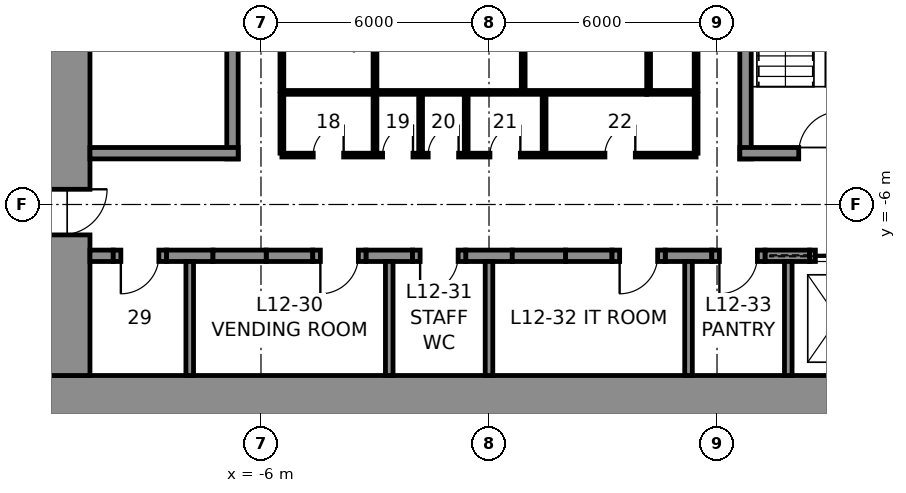
"""IFC4 building model, lengths in metres.
Left out: names, types, materials, properties, quantities, classifications, styles, units other than length and angle.
Written with IfcOpenShell. Run it as: python <this file> out.ifc"""

import sys

from ifc_helpers import new_model, si_unit, direction, frame, frame_2d, origin, place, context, subcontext, project, spatial, rectangle, extrude, element, fill, save


model = new_model("IFC4")
c1 = context("Model", 3, precision=1e-05, world=origin(), true_north=direction((0.0, 1.0)))
c2 = subcontext(c1, "Body", "Model", "MODEL_VIEW")
j1 = project(units=[si_unit("LENGTHUNIT", "METRE"), si_unit("PLANEANGLEUNIT", "RADIAN")], contexts=[c1])
p1 = place(None, origin())
s1 = spatial("IfcSite", under=j1, at=p1, CompositionType="ELEMENT")
p2 = place(p1, origin())
s2 = spatial("IfcBuilding", under=s1, at=p2, CompositionType="ELEMENT")
p3 = place(p2, frame((0.0, 0.0, 65.0)))
s3 = spatial("IfcBuildingStorey", under=s2, at=p3, CompositionType="ELEMENT", Elevation=65.0)
p4 = place(p3, frame((12.0, -11.25, 0.0), z_axis=(0.0, 0.0, 1.0), x_axis=(-1.0, 0.0, 0.0)))
e1 = element("IfcWall", 1, at=p4, inside=s3, PredefinedType="SHEAR", context=c2, shape_type="SweptSolid", body=[
    extrude(rectangle(XDim=24.0, YDim=1.5, at=frame_2d((12.0, 0.0))), origin(), (0.0, 0.0, 1.0), 5.5),
])
p5 = place(p3, frame((-11.25, -10.5, 0.0), z_axis=(0.0, 0.0, 1.0), x_axis=(0.0, 1.0, 0.0)))
e2 = element("IfcWall", 2, at=p5, inside=s3, PredefinedType="SHEAR", context=c2, shape_type="SweptSolid", body=[
    extrude(rectangle(XDim=21.0, YDim=1.5, at=frame_2d((10.5, 0.0))), origin(), (0.0, 0.0, 1.0), 5.5),
])
p6 = place(p5, frame((16.1, 0.0, 0.0)))
e3 = element("IfcOpeningElement", 3, at=p6, cuts=e2, PredefinedType="OPENING", context=c2, shape_type="SweptSolid", body=[
    extrude(rectangle(XDim=1.2, YDim=2.3, at=frame_2d((0.6, 1.15))), frame((0.0, 0.76, 0.0), z_axis=(0.0, -1.0, 0.0), x_axis=(1.0, 0.0, 0.0)), (0.0, 0.0, 1.0), 1.52),
])
p7 = place(p5, frame((3.7, 0.0, 0.0)))
e4 = element("IfcOpeningElement", 4, at=p7, cuts=e2, PredefinedType="OPENING", context=c2, shape_type="SweptSolid", body=[
    extrude(rectangle(XDim=1.2, YDim=2.3, at=frame_2d((0.6, 1.15))), frame((0.0, 0.76, 0.0), z_axis=(0.0, -1.0, 0.0), x_axis=(1.0, 0.0, 0.0)), (0.0, 0.0, 1.0), 1.52),
])
p8 = place(p3, frame((-10.5, -7.35, 0.0), z_axis=(0.0, 0.0, 1.0), x_axis=(1.0, 0.0, 0.0)))
e5 = element("IfcWall", 5, at=p8, inside=s3, PredefinedType="SHEAR", context=c2, shape_type="SweptSolid", body=[
    extrude(rectangle(XDim=0.613, YDim=0.3, at=frame_2d((0.306, 0.0))), origin(), (0.0, 0.0, 1.0), 5.5),
])
for number, where, z_axis, x_axis in (
    (6, (-8.488, -7.35, 0.0), (0.0, 0.0, 1.0), (1.0, 0.0, 0.0)),
    (7, (-5.863, -7.35, 0.0), (0.0, 0.0, 1.0), (1.0, 0.0, 0.0)),
    (8, (-3.238, -7.35, 0.0), (0.0, 0.0, 1.0), (1.0, 0.0, 0.0)),
    (9, (-0.613, -7.35, 0.0), (0.0, 0.0, 1.0), (1.0, 0.0, 0.0)),
    (10, (2.012, -7.35, 0.0), (0.0, 0.0, 1.0), (1.0, 0.0, 0.0)),
    (11, (4.637, -7.35, 0.0), (0.0, 0.0, 1.0), (1.0, 0.0, 0.0)),
):
    element("IfcWall", number, at=place(p3, frame(where, z_axis=z_axis, x_axis=x_axis)), inside=s3, PredefinedType="SHEAR", context=c2, shape_type="SweptSolid", body=[
        extrude(rectangle(XDim=1.225, YDim=0.3, at=frame_2d((0.613, 0.0))), origin(), (0.0, 0.0, 1.0), 5.5),
    ])
p9 = place(p3, frame((7.262, -7.35, 0.0), z_axis=(0.0, 0.0, 1.0), x_axis=(1.0, 0.0, 0.0)))
e12 = element("IfcWall", 12, at=p9, inside=s3, PredefinedType="SHEAR", context=c2, shape_type="SweptSolid", body=[
    extrude(rectangle(XDim=1.175, YDim=0.3, at=frame_2d((0.587, 0.0))), origin(), (0.0, 0.0, 1.0), 5.5),
])
p10 = place(p3, frame((-9.887, -7.35, 0.0), z_axis=(0.0, 0.0, 1.0), x_axis=(1.0, 0.0, 0.0)))
e13 = element("IfcWall", 13, at=p10, inside=s3, PredefinedType="PARTITIONING", context=c2, shape_type="SweptSolid", body=[
    extrude(rectangle(XDim=1.4, YDim=0.3, at=frame_2d((0.7, 0.0))), origin(), (0.0, 0.0, 1.0), 5.5),
])
p11 = place(p10, frame((0.2, 0.0, 0.0)))
e14 = element("IfcOpeningElement", 14, at=p11, cuts=e13, PredefinedType="OPENING", context=c2, shape_type="SweptSolid", body=[
    extrude(rectangle(XDim=1.0, YDim=2.3, at=frame_2d((0.5, 1.15))), frame((0.0, 0.16, 0.0), z_axis=(0.0, -1.0, 0.0), x_axis=(1.0, 0.0, 0.0)), (0.0, 0.0, 1.0), 0.32),
])
p12 = place(p3, frame((-7.262, -7.35, 0.0), z_axis=(0.0, 0.0, 1.0), x_axis=(1.0, 0.0, 0.0)))
e15 = element("IfcWall", 15, at=p12, inside=s3, PredefinedType="PARTITIONING", context=c2, shape_type="SweptSolid", body=[
    extrude(rectangle(XDim=1.4, YDim=0.3, at=frame_2d((0.7, 0.0))), origin(), (0.0, 0.0, 1.0), 5.5),
])
p13 = place(p3, frame((-4.637, -7.35, 0.0), z_axis=(0.0, 0.0, 1.0), x_axis=(1.0, 0.0, 0.0)))
e16 = element("IfcWall", 16, at=p13, inside=s3, PredefinedType="PARTITIONING", context=c2, shape_type="SweptSolid", body=[
    extrude(rectangle(XDim=1.4, YDim=0.3, at=frame_2d((0.7, 0.0))), origin(), (0.0, 0.0, 1.0), 5.5),
])
p14 = place(p13, frame((0.2, 0.0, 0.0)))
e17 = element("IfcOpeningElement", 17, at=p14, cuts=e16, PredefinedType="OPENING", context=c2, shape_type="SweptSolid", body=[
    extrude(rectangle(XDim=1.0, YDim=2.3, at=frame_2d((0.5, 1.15))), frame((0.0, 0.16, 0.0), z_axis=(0.0, -1.0, 0.0), x_axis=(1.0, 0.0, 0.0)), (0.0, 0.0, 1.0), 0.32),
])
p15 = place(p3, frame((-2.012, -7.35, 0.0), z_axis=(0.0, 0.0, 1.0), x_axis=(1.0, 0.0, 0.0)))
e18 = element("IfcWall", 18, at=p15, inside=s3, PredefinedType="PARTITIONING", context=c2, shape_type="SweptSolid", body=[
    extrude(rectangle(XDim=1.4, YDim=0.3, at=frame_2d((0.7, 0.0))), origin(), (0.0, 0.0, 1.0), 5.5),
])
p16 = place(p15, frame((0.2, 0.0, 0.0)))
e19 = element("IfcOpeningElement", 19, at=p16, cuts=e18, PredefinedType="OPENING", context=c2, shape_type="SweptSolid", body=[
    extrude(rectangle(XDim=1.0, YDim=2.3, at=frame_2d((0.5, 1.15))), frame((0.0, 0.16, 0.0), z_axis=(0.0, -1.0, 0.0), x_axis=(1.0, 0.0, 0.0)), (0.0, 0.0, 1.0), 0.32),
])
p17 = place(p3, frame((0.613, -7.35, 0.0), z_axis=(0.0, 0.0, 1.0), x_axis=(1.0, 0.0, 0.0)))
e20 = element("IfcWall", 20, at=p17, inside=s3, PredefinedType="PARTITIONING", context=c2, shape_type="SweptSolid", body=[
    extrude(rectangle(XDim=1.4, YDim=0.3, at=frame_2d((0.7, 0.0))), origin(), (0.0, 0.0, 1.0), 5.5),
])
p18 = place(p3, frame((3.238, -7.35, 0.0), z_axis=(0.0, 0.0, 1.0), x_axis=(1.0, 0.0, 0.0)))
e21 = element("IfcWall", 21, at=p18, inside=s3, PredefinedType="PARTITIONING", context=c2, shape_type="SweptSolid", body=[
    extrude(rectangle(XDim=1.4, YDim=0.3, at=frame_2d((0.7, 0.0))), origin(), (0.0, 0.0, 1.0), 5.5),
])
p19 = place(p18, frame((0.2, 0.0, 0.0)))
e22 = element("IfcOpeningElement", 22, at=p19, cuts=e21, PredefinedType="OPENING", context=c2, shape_type="SweptSolid", body=[
    extrude(rectangle(XDim=1.0, YDim=2.3, at=frame_2d((0.5, 1.15))), frame((0.0, 0.16, 0.0), z_axis=(0.0, -1.0, 0.0), x_axis=(1.0, 0.0, 0.0)), (0.0, 0.0, 1.0), 0.32),
])
p20 = place(p3, frame((5.863, -7.35, 0.0), z_axis=(0.0, 0.0, 1.0), x_axis=(1.0, 0.0, 0.0)))
e23 = element("IfcWall", 23, at=p20, inside=s3, PredefinedType="PARTITIONING", context=c2, shape_type="SweptSolid", body=[
    extrude(rectangle(XDim=1.4, YDim=0.3, at=frame_2d((0.7, 0.0))), origin(), (0.0, 0.0, 1.0), 5.5),
])
p21 = place(p20, frame((0.2, 0.0, 0.0)))
e24 = element("IfcOpeningElement", 24, at=p21, cuts=e23, PredefinedType="OPENING", context=c2, shape_type="SweptSolid", body=[
    extrude(rectangle(XDim=1.0, YDim=2.3, at=frame_2d((0.5, 1.15))), frame((0.0, 0.16, 0.0), z_axis=(0.0, -1.0, 0.0), x_axis=(1.0, 0.0, 0.0)), (0.0, 0.0, 1.0), 0.32),
])
p22 = place(p3, frame((8.438, -7.35, 0.0), z_axis=(0.0, 0.0, 1.0), x_axis=(1.0, 0.0, 0.0)))
e25 = element("IfcWall", 25, at=p22, inside=s3, PredefinedType="PARTITIONING", context=c2, shape_type="SweptSolid", body=[
    extrude(rectangle(XDim=1.5, YDim=0.3, at=frame_2d((0.75, 0.0))), origin(), (0.0, 0.0, 1.0), 5.5),
])
p23 = place(p22, frame((0.15, 0.0, 0.0)))
e26 = element("IfcOpeningElement", 26, at=p23, cuts=e25, PredefinedType="OPENING", context=c2, shape_type="SweptSolid", body=[
    extrude(rectangle(XDim=1.2, YDim=2.3, at=frame_2d((0.6, 1.15))), frame((0.0, 0.16, 0.0), z_axis=(0.0, -1.0, 0.0), x_axis=(1.0, 0.0, 0.0)), (0.0, 0.0, 1.0), 0.32),
])
for number, where, z_axis, x_axis in (
    (27, (-7.875, -10.5, 0.0), (0.0, 0.0, 1.0), (0.0, 1.0, 0.0)),
    (28, (-2.625, -10.5, 0.0), (0.0, 0.0, 1.0), (0.0, 1.0, 0.0)),
    (29, (0.0, -10.5, 0.0), (0.0, 0.0, 1.0), (0.0, 1.0, 0.0)),
    (30, (5.25, -10.5, 0.0), (0.0, 0.0, 1.0), (0.0, 1.0, 0.0)),
    (31, (7.875, -10.5, 0.0), (0.0, 0.0, 1.0), (0.0, 1.0, 0.0)),
):
    element("IfcWall", number, at=place(p3, frame(where, z_axis=z_axis, x_axis=x_axis)), inside=s3, PredefinedType="PARTITIONING", context=c2, shape_type="SweptSolid", body=[
        extrude(rectangle(XDim=3.0, YDim=0.2, at=frame_2d((1.5, 0.0))), origin(), (0.0, 0.0, 1.0), 5.5),
    ])
p24 = place(p3, frame((-6.75, -4.8, 0.0), z_axis=(0.0, 0.0, 1.0), x_axis=(0.0, 1.0, 0.0)))
e32 = element("IfcWall", 32, at=p24, inside=s3, PredefinedType="SOLIDWALL", context=c2, shape_type="SweptSolid", body=[
    extrude(rectangle(XDim=9.6, YDim=0.3, at=frame_2d((4.8, 0.0))), origin(), (0.0, 0.0, 1.0), 5.25),
])
p25 = place(p3, frame((-6.6, -4.65, 0.0), z_axis=(0.0, 0.0, 1.0), x_axis=(-1.0, 0.0, 0.0)))
e33 = element("IfcWall", 33, at=p25, inside=s3, PredefinedType="SOLIDWALL", context=c2, shape_type="SweptSolid", body=[
    extrude(rectangle(XDim=3.9, YDim=0.3, at=frame_2d((1.95, 0.0))), origin(), (0.0, 0.0, 1.0), 5.25),
])
p26 = place(p3, frame((6.75, -4.8, 0.0), z_axis=(0.0, 0.0, 1.0), x_axis=(0.0, 1.0, 0.0)))
e34 = element("IfcWall", 34, at=p26, inside=s3, PredefinedType="SOLIDWALL", context=c2, shape_type="SweptSolid", body=[
    extrude(rectangle(XDim=9.6, YDim=0.3, at=frame_2d((4.8, 0.0))), origin(), (0.0, 0.0, 1.0), 5.25),
])
p27 = place(p3, frame((10.5, -4.65, 0.0), z_axis=(0.0, 0.0, 1.0), x_axis=(-1.0, 0.0, 0.0)))
e35 = element("IfcWall", 35, at=p27, inside=s3, PredefinedType="SOLIDWALL", context=c2, shape_type="SweptSolid", body=[
    extrude(rectangle(XDim=3.9, YDim=0.3, at=frame_2d((1.95, 0.0))), origin(), (0.0, 0.0, 1.0), 5.25),
])
p28 = place(p27, frame((1.25, 0.0, 0.0)))
e36 = element("IfcOpeningElement", 36, at=p28, cuts=e35, PredefinedType="OPENING", context=c2, shape_type="SweptSolid", body=[
    extrude(rectangle(XDim=1.1, YDim=2.3, at=frame_2d((0.55, 1.15))), frame((0.0, 0.16, 0.0), z_axis=(0.0, -1.0, 0.0), x_axis=(1.0, 0.0, 0.0)), (0.0, 0.0, 1.0), 0.32),
])
p29 = place(p3, frame((4.15, -3.05, 0.0), z_axis=(0.0, 0.0, 1.0), x_axis=(-1.0, 0.0, 0.0)))
e37 = element("IfcWall", 37, at=p29, inside=s3, PredefinedType="PARTITIONING", context=c2, shape_type="SweptSolid", body=[
    extrude(rectangle(XDim=9.6, YDim=0.1, at=frame_2d((4.8, 0.0))), origin(), (0.0, 0.0, 1.0), 5.25),
])
p30 = place(p3, frame((5.45, -3.05, 0.0), z_axis=(0.0, 0.0, 1.0), x_axis=(-1.0, 0.0, 0.0)))
e38 = element("IfcWall", 38, at=p30, inside=s3, PredefinedType="PARTITIONING", context=c2, shape_type="SweptSolid", body=[
    extrude(rectangle(XDim=1.3, YDim=0.1, at=frame_2d((0.65, 0.0))), origin(), (0.0, 0.0, 1.0), 5.25),
])
for number, where, z_axis, x_axis in (
    (39, (5.45, 3.0, 0.0), (0.0, 0.0, 1.0), (0.0, -1.0, 0.0)),
    (40, (-5.45, -3.0, 0.0), (0.0, 0.0, 1.0), (0.0, 1.0, 0.0)),
    (41, (-3.0, -3.0, 0.0), (0.0, 0.0, 1.0), (0.0, 1.0, 0.0)),
    (42, (0.9, -3.0, 0.0), (0.0, 0.0, 1.0), (0.0, 1.0, 0.0)),
    (43, (4.2, -3.0, 0.0), (0.0, 0.0, 1.0), (0.0, 1.0, 0.0)),
):
    element("IfcWall", number, at=place(p3, frame(where, z_axis=z_axis, x_axis=x_axis)), inside=s3, PredefinedType="PARTITIONING", context=c2, shape_type="SweptSolid", body=[
        extrude(rectangle(XDim=6.0, YDim=0.1, at=frame_2d((3.0, 0.0))), origin(), (0.0, 0.0, 1.0), 5.25),
    ])
p31 = place(p3, frame((5.45, -4.7, 0.0), z_axis=(0.0, 0.0, 1.0), x_axis=(-1.0, 0.0, 0.0)))
e44 = element("IfcWall", 44, at=p31, inside=s3, PredefinedType="PARTITIONING", context=c2, shape_type="SweptSolid", body=[
    extrude(rectangle(XDim=10.9, YDim=0.1, at=frame_2d((5.45, 0.0))), origin(), (0.0, 0.0, 1.0), 5.25),
])
p32 = place(p31, frame((9.275, 0.0, 0.0)))
e45 = element("IfcOpeningElement", 45, at=p32, cuts=e44, PredefinedType="OPENING", context=c2, shape_type="SweptSolid", body=[
    extrude(rectangle(XDim=0.8, YDim=2.3, at=frame_2d((0.4, 1.15))), frame((0.0, 0.06, 0.0), z_axis=(0.0, -1.0, 0.0), x_axis=(1.0, 0.0, 0.0)), (0.0, 0.0, 1.0), 0.12),
])
p33 = place(p31, frame((7.45, 0.0, 0.0)))
e46 = element("IfcOpeningElement", 46, at=p33, cuts=e44, PredefinedType="OPENING", context=c2, shape_type="SweptSolid", body=[
    extrude(rectangle(XDim=0.8, YDim=2.3, at=frame_2d((0.4, 1.15))), frame((0.0, 0.06, 0.0), z_axis=(0.0, -1.0, 0.0), x_axis=(1.0, 0.0, 0.0)), (0.0, 0.0, 1.0), 0.12),
])
p34 = place(p31, frame((6.25, 0.0, 0.0)))
e47 = element("IfcOpeningElement", 47, at=p34, cuts=e44, PredefinedType="OPENING", context=c2, shape_type="SweptSolid", body=[
    extrude(rectangle(XDim=0.8, YDim=2.3, at=frame_2d((0.4, 1.15))), frame((0.0, 0.06, 0.0), z_axis=(0.0, -1.0, 0.0), x_axis=(1.0, 0.0, 0.0)), (0.0, 0.0, 1.0), 0.12),
])
p35 = place(p31, frame((4.625, 0.0, 0.0)))
e48 = element("IfcOpeningElement", 48, at=p35, cuts=e44, PredefinedType="OPENING", context=c2, shape_type="SweptSolid", body=[
    extrude(rectangle(XDim=0.8, YDim=2.3, at=frame_2d((0.4, 1.15))), frame((0.0, 0.06, 0.0), z_axis=(0.0, -1.0, 0.0), x_axis=(1.0, 0.0, 0.0)), (0.0, 0.0, 1.0), 0.12),
])
p36 = place(p31, frame((1.6, 0.0, 0.0)))
e49 = element("IfcOpeningElement", 49, at=p36, cuts=e44, PredefinedType="OPENING", context=c2, shape_type="SweptSolid", body=[
    extrude(rectangle(XDim=0.8, YDim=2.3, at=frame_2d((0.4, 1.15))), frame((0.0, 0.06, 0.0), z_axis=(0.0, -1.0, 0.0), x_axis=(1.0, 0.0, 0.0)), (0.0, 0.0, 1.0), 0.12),
])
for number, where, z_axis, x_axis in (
    (50, (-5.45, -3.1, 0.0), (0.0, 0.0, 1.0), (0.0, -1.0, 0.0)),
    (51, (5.45, -3.1, 0.0), (0.0, 0.0, 1.0), (0.0, -1.0, 0.0)),
    (52, (-3.0, -3.1, 0.0), (0.0, 0.0, 1.0), (0.0, -1.0, 0.0)),
    (53, (-1.8, -3.1, 0.0), (0.0, 0.0, 1.0), (0.0, -1.0, 0.0)),
    (54, (-0.6, -3.1, 0.0), (0.0, 0.0, 1.0), (0.0, -1.0, 0.0)),
    (55, (1.45, -3.1, 0.0), (0.0, 0.0, 1.0), (0.0, -1.0, 0.0)),
):
    element("IfcWall", number, at=place(p3, frame(where, z_axis=z_axis, x_axis=x_axis)), inside=s3, PredefinedType="PARTITIONING", context=c2, shape_type="SweptSolid", body=[
        extrude(rectangle(XDim=1.55, YDim=0.1, at=frame_2d((0.775, 0.0))), origin(), (0.0, 0.0, 1.0), 5.25),
    ])
p37 = place(p28, frame((1.1, 0.0, 0.0), z_axis=(0.0, 0.0, 1.0), x_axis=(-1.0, 0.0, 0.0)))
e56 = element("IfcDoor", 56, at=p37, inside=s3, OperationType="SINGLE_SWING_RIGHT", PredefinedType="DOOR", context=c2, shape_type="SweptSolid", body=[
    extrude(rectangle(XDim=1.1, YDim=2.3, at=frame_2d((0.55, 1.15))), frame((0.0, 0.025, 0.0), z_axis=(0.0, -1.0, 0.0), x_axis=(1.0, 0.0, 0.0)), (0.0, 0.0, 1.0), 0.05),
])
fill(e36, e56)
p38 = place(p32, frame((0.8, 0.0, 0.0), z_axis=(0.0, 0.0, 1.0), x_axis=(-1.0, 0.0, 0.0)))
e57 = element("IfcDoor", 57, at=p38, inside=s3, OperationType="SINGLE_SWING_RIGHT", PredefinedType="DOOR", context=c2, shape_type="SweptSolid", body=[
    extrude(rectangle(XDim=0.8, YDim=2.3, at=frame_2d((0.4, 1.15))), frame((0.0, 0.025, 0.0), z_axis=(0.0, -1.0, 0.0), x_axis=(1.0, 0.0, 0.0)), (0.0, 0.0, 1.0), 0.05),
])
fill(e45, e57)
p39 = place(p33, frame((0.8, 0.0, 0.0), z_axis=(0.0, 0.0, 1.0), x_axis=(-1.0, 0.0, 0.0)))
e58 = element("IfcDoor", 58, at=p39, inside=s3, OperationType="SINGLE_SWING_RIGHT", PredefinedType="DOOR", context=c2, shape_type="SweptSolid", body=[
    extrude(rectangle(XDim=0.8, YDim=2.3, at=frame_2d((0.4, 1.15))), frame((0.0, 0.025, 0.0), z_axis=(0.0, -1.0, 0.0), x_axis=(1.0, 0.0, 0.0)), (0.0, 0.0, 1.0), 0.05),
])
fill(e46, e58)
p40 = place(p34, frame((0.8, 0.0, 0.0), z_axis=(0.0, 0.0, 1.0), x_axis=(-1.0, 0.0, 0.0)))
e59 = element("IfcDoor", 59, at=p40, inside=s3, OperationType="SINGLE_SWING_RIGHT", PredefinedType="DOOR", context=c2, shape_type="SweptSolid", body=[
    extrude(rectangle(XDim=0.8, YDim=2.3, at=frame_2d((0.4, 1.15))), frame((0.0, 0.025, 0.0), z_axis=(0.0, -1.0, 0.0), x_axis=(1.0, 0.0, 0.0)), (0.0, 0.0, 1.0), 0.05),
])
fill(e47, e59)
p41 = place(p35, frame((0.8, 0.0, 0.0), z_axis=(0.0, 0.0, 1.0), x_axis=(-1.0, 0.0, 0.0)))
e60 = element("IfcDoor", 60, at=p41, inside=s3, OperationType="SINGLE_SWING_RIGHT", PredefinedType="DOOR", context=c2, shape_type="SweptSolid", body=[
    extrude(rectangle(XDim=0.8, YDim=2.3, at=frame_2d((0.4, 1.15))), frame((0.0, 0.025, 0.0), z_axis=(0.0, -1.0, 0.0), x_axis=(1.0, 0.0, 0.0)), (0.0, 0.0, 1.0), 0.05),
])
fill(e48, e60)
p42 = place(p36, frame((0.8, 0.0, 0.0), z_axis=(0.0, 0.0, 1.0), x_axis=(-1.0, 0.0, 0.0)))
e61 = element("IfcDoor", 61, at=p42, inside=s3, OperationType="SINGLE_SWING_RIGHT", PredefinedType="DOOR", context=c2, shape_type="SweptSolid", body=[
    extrude(rectangle(XDim=0.8, YDim=2.3, at=frame_2d((0.4, 1.15))), frame((0.0, 0.025, 0.0), z_axis=(0.0, -1.0, 0.0), x_axis=(1.0, 0.0, 0.0)), (0.0, 0.0, 1.0), 0.05),
])
fill(e49, e61)
p43 = place(p11, frame((1.0, 0.0, 0.0), z_axis=(0.0, 0.0, 1.0), x_axis=(-1.0, 0.0, 0.0)))
e62 = element("IfcDoor", 62, at=p43, inside=s3, OperationType="SINGLE_SWING_RIGHT", PredefinedType="DOOR", context=c2, shape_type="SweptSolid", body=[
    extrude(rectangle(XDim=1.0, YDim=2.3, at=frame_2d((0.5, 1.15))), frame((0.0, 0.025, 0.0), z_axis=(0.0, -1.0, 0.0), x_axis=(1.0, 0.0, 0.0)), (0.0, 0.0, 1.0), 0.05),
])
fill(e14, e62)
p44 = place(p14, frame((1.0, 0.0, 0.0), z_axis=(0.0, 0.0, 1.0), x_axis=(-1.0, 0.0, 0.0)))
e63 = element("IfcDoor", 63, at=p44, inside=s3, OperationType="SINGLE_SWING_RIGHT", PredefinedType="DOOR", context=c2, shape_type="SweptSolid", body=[
    extrude(rectangle(XDim=1.0, YDim=2.3, at=frame_2d((0.5, 1.15))), frame((0.0, 0.025, 0.0), z_axis=(0.0, -1.0, 0.0), x_axis=(1.0, 0.0, 0.0)), (0.0, 0.0, 1.0), 0.05),
])
fill(e17, e63)
p45 = place(p16, frame((1.0, 0.0, 0.0), z_axis=(0.0, 0.0, 1.0), x_axis=(-1.0, 0.0, 0.0)))
e64 = element("IfcDoor", 64, at=p45, inside=s3, OperationType="SINGLE_SWING_RIGHT", PredefinedType="DOOR", context=c2, shape_type="SweptSolid", body=[
    extrude(rectangle(XDim=1.0, YDim=2.3, at=frame_2d((0.5, 1.15))), frame((0.0, 0.025, 0.0), z_axis=(0.0, -1.0, 0.0), x_axis=(1.0, 0.0, 0.0)), (0.0, 0.0, 1.0), 0.05),
])
fill(e19, e64)
p46 = place(p19, frame((1.0, 0.0, 0.0), z_axis=(0.0, 0.0, 1.0), x_axis=(-1.0, 0.0, 0.0)))
e65 = element("IfcDoor", 65, at=p46, inside=s3, OperationType="SINGLE_SWING_RIGHT", PredefinedType="DOOR", context=c2, shape_type="SweptSolid", body=[
    extrude(rectangle(XDim=1.0, YDim=2.3, at=frame_2d((0.5, 1.15))), frame((0.0, 0.025, 0.0), z_axis=(0.0, -1.0, 0.0), x_axis=(1.0, 0.0, 0.0)), (0.0, 0.0, 1.0), 0.05),
])
fill(e22, e65)
p47 = place(p21, frame((1.0, 0.0, 0.0), z_axis=(0.0, 0.0, 1.0), x_axis=(-1.0, 0.0, 0.0)))
e66 = element("IfcDoor", 66, at=p47, inside=s3, OperationType="SINGLE_SWING_RIGHT", PredefinedType="DOOR", context=c2, shape_type="SweptSolid", body=[
    extrude(rectangle(XDim=1.0, YDim=2.3, at=frame_2d((0.5, 1.15))), frame((0.0, 0.025, 0.0), z_axis=(0.0, -1.0, 0.0), x_axis=(1.0, 0.0, 0.0)), (0.0, 0.0, 1.0), 0.05),
])
fill(e24, e66)
p48 = place(p7, frame((1.2, 0.0, 0.0), z_axis=(0.0, 0.0, 1.0), x_axis=(-1.0, 0.0, 0.0)))
e67 = element("IfcDoor", 67, at=p48, inside=s3, OperationType="SINGLE_SWING_LEFT", PredefinedType="DOOR", context=c2, shape_type="SweptSolid", body=[
    extrude(rectangle(XDim=1.2, YDim=2.3, at=frame_2d((0.6, 1.15))), frame((0.0, 0.025, 0.0), z_axis=(0.0, -1.0, 0.0), x_axis=(1.0, 0.0, 0.0)), (0.0, 0.0, 1.0), 0.05),
])
fill(e4, e67)
p49 = place(p23, origin())
e68 = element("IfcDoor", 68, at=p49, inside=s3, OperationType="SLIDING_TO_LEFT", PredefinedType="DOOR", context=c2, shape_type="SweptSolid", body=[
    extrude(rectangle(XDim=1.2, YDim=2.3, at=frame_2d((0.6, 1.15))), frame((0.0, 0.025, 0.0), z_axis=(0.0, -1.0, 0.0), x_axis=(1.0, 0.0, 0.0)), (0.0, 0.0, 1.0), 0.05),
])
fill(e26, e68)
save(model, sys.argv[1])
